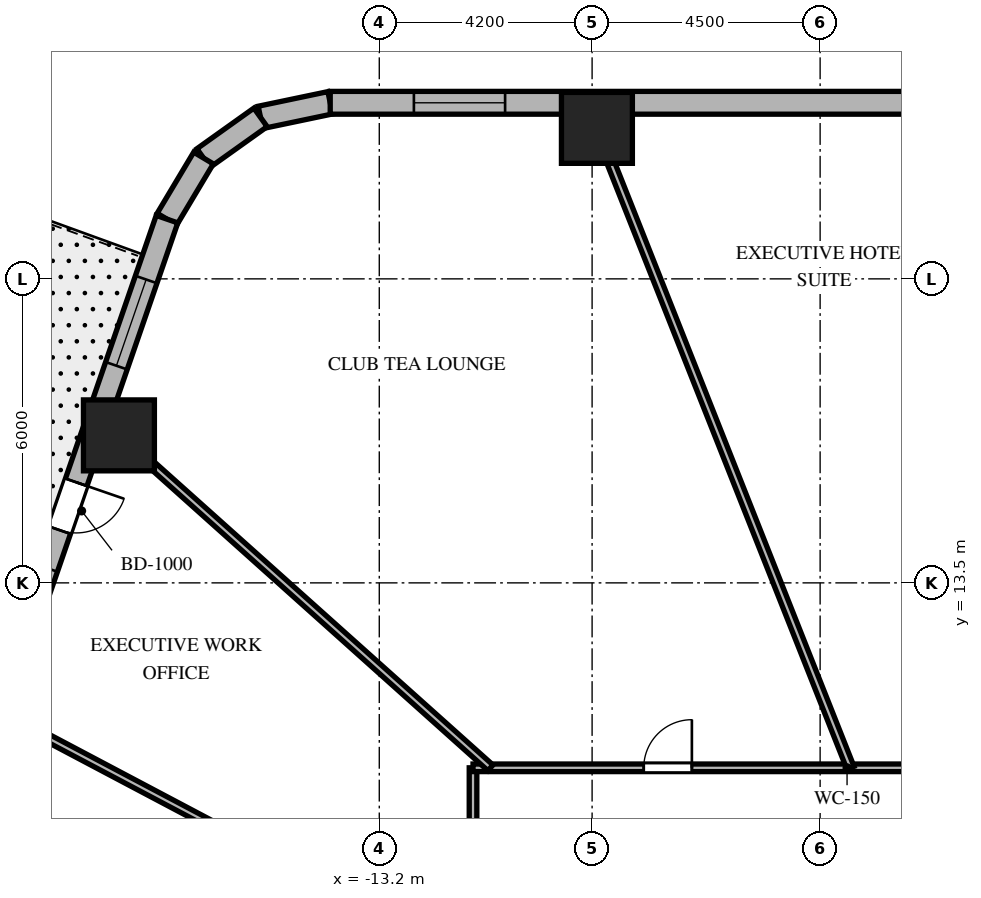
"""IFC4 building model, lengths in metres.
Left out: names, types, materials, properties, quantities, classifications, styles, units other than length and angle.
Written with IfcOpenShell. Run it as: python <this file> out.ifc"""

import sys

from ifc_helpers import new_model, si_unit, direction, frame, frame_2d, origin, origin_2d, place, context, subcontext, project, spatial, rectangle, extrude, element, fill, save


model = new_model("IFC4")
c1 = context("Model", 3, precision=1e-05, world=origin(), true_north=direction((0.0, 1.0)))
c2 = subcontext(c1, "Body", "Model", "MODEL_VIEW")
j1 = project(units=[si_unit("LENGTHUNIT", "METRE"), si_unit("PLANEANGLEUNIT", "RADIAN")], contexts=[c1])
p1 = place(None, origin())
s1 = spatial("IfcSite", under=j1, at=p1, CompositionType="ELEMENT")
p2 = place(p1, origin())
s2 = spatial("IfcBuilding", under=s1, at=p2, CompositionType="ELEMENT")
p3 = place(p2, frame((0.0, 0.0, 78.6)))
s3 = spatial("IfcBuildingStorey", under=s2, at=p3, CompositionType="ELEMENT", Elevation=78.6)
for number, where, z_axis, x_axis in (
    (1, (-8.905, 22.48, 0.0), (0.0, 0.0, 1.0), (1.0, 0.0, 0.0)),
    (2, (-18.338, 16.411, 0.0), (0.0, 0.0, 1.0), (1.0, 0.0, 0.0)),
):
    element("IfcColumn", number, at=place(p3, frame(where, z_axis=z_axis, x_axis=x_axis)), inside=s3, PredefinedType="COLUMN", context=c2, shape_type="SweptSolid", body=[
        extrude(rectangle(XDim=1.4, YDim=1.4, at=origin_2d()), origin(), (0.0, 0.0, 1.0), 3.7),
    ])
p4 = place(p3, frame((-14.168, 22.975, 0.0), z_axis=(0.0, 0.0, 1.0), x_axis=(-0.978770371074, -0.204959900243, 0.0)))
e3 = element("IfcWall", 3, at=p4, inside=s3, PredefinedType="SOLIDWALL", context=c2, shape_type="SweptSolid", body=[
    extrude(rectangle(XDim=1.406, YDim=0.45, at=frame_2d((0.703, 0.0))), origin(), (0.0, 0.0, 1.0), 3.4),
])
p5 = place(p3, frame((-15.544, 22.687, 0.0), z_axis=(0.0, 0.0, 1.0), x_axis=(-0.814210854316, -0.580569276412, 0.0)))
e4 = element("IfcWall", 4, at=p5, inside=s3, PredefinedType="SOLIDWALL", context=c2, shape_type="SweptSolid", body=[
    extrude(rectangle(XDim=1.381, YDim=0.45, at=frame_2d((0.691, 0.0))), origin(), (0.0, 0.0, 1.0), 3.4),
])
p6 = place(p3, frame((-16.669, 21.885, 0.0), z_axis=(0.0, 0.0, 1.0), x_axis=(-0.512936712947, -0.858426425799, 0.0)))
e5 = element("IfcWall", 5, at=p6, inside=s3, PredefinedType="SOLIDWALL", context=c2, shape_type="SweptSolid", body=[
    extrude(rectangle(XDim=1.406, YDim=0.45, at=frame_2d((0.703, 0.0))), origin(), (0.0, 0.0, 1.0), 3.4),
])
p7 = place(p3, frame((12.221, 22.975, 0.0), z_axis=(0.0, 0.0, 1.0), x_axis=(-1.0, 0.0, 0.0)))
e6 = element("IfcWall", 6, at=p7, inside=s3, PredefinedType="SOLIDWALL", context=c2, shape_type="SweptSolid", body=[
    extrude(rectangle(XDim=26.389, YDim=0.45, at=frame_2d((13.195, 0.0))), origin(), (0.0, 0.0, 1.0), 3.4),
])
p8 = place(p7, frame((1.653, 0.0, 0.8)))
e7 = element("IfcOpeningElement", 7, at=p8, cuts=e6, PredefinedType="OPENING", context=c2, shape_type="SweptSolid", body=[
    extrude(rectangle(XDim=1.8, YDim=1.8, at=frame_2d((0.9, 0.9))), frame((0.0, 0.235, 0.0), z_axis=(0.0, -1.0, 0.0), x_axis=(1.0, 0.0, 0.0)), (0.0, 0.0, 1.0), 0.47),
])
p9 = place(p7, frame((12.296, 0.0, 0.8)))
e8 = element("IfcOpeningElement", 8, at=p9, cuts=e6, PredefinedType="OPENING", context=c2, shape_type="SweptSolid", body=[
    extrude(rectangle(XDim=1.8, YDim=1.8, at=frame_2d((0.9, 0.9))), frame((0.0, 0.235, 0.0), z_axis=(0.0, -1.0, 0.0), x_axis=(1.0, 0.0, 0.0)), (0.0, 0.0, 1.0), 0.47),
])
p10 = place(p7, frame((22.938, 0.0, 0.8)))
e9 = element("IfcOpeningElement", 9, at=p10, cuts=e6, PredefinedType="OPENING", context=c2, shape_type="SweptSolid", body=[
    extrude(rectangle(XDim=1.8, YDim=1.8, at=frame_2d((0.9, 0.9))), frame((0.0, 0.235, 0.0), z_axis=(0.0, -1.0, 0.0), x_axis=(1.0, 0.0, 0.0)), (0.0, 0.0, 1.0), 0.47),
])
p11 = place(p3, frame((-17.39, 20.678, 0.0), z_axis=(0.0, 0.0, 1.0), x_axis=(-0.326068018294, -0.945346310854, 0.0)))
e10 = element("IfcWall", 10, at=p11, inside=s3, PredefinedType="SOLIDWALL", context=c2, shape_type="SweptSolid", body=[
    extrude(rectangle(XDim=21.793, YDim=0.45, at=frame_2d((10.896, 0.0))), origin(), (0.0, 0.0, 1.0), 3.4),
])
p12 = place(p11, frame((5.493, 0.0, 0.0)))
e11 = element("IfcOpeningElement", 11, at=p12, cuts=e10, PredefinedType="OPENING", context=c2, shape_type="SweptSolid", body=[
    extrude(rectangle(XDim=1.0, YDim=2.15, at=frame_2d((0.5, 1.075))), frame((0.0, 0.235, 0.0), z_axis=(0.0, -1.0, 0.0), x_axis=(1.0, 0.0, 0.0)), (0.0, 0.0, 1.0), 0.47),
])
p13 = place(p11, frame((1.26, 0.0, 0.8)))
e12 = element("IfcOpeningElement", 12, at=p13, cuts=e10, PredefinedType="OPENING", context=c2, shape_type="SweptSolid", body=[
    extrude(rectangle(XDim=1.8, YDim=1.8, at=frame_2d((0.9, 0.9))), frame((0.0, 0.235, 0.0), z_axis=(0.0, -1.0, 0.0), x_axis=(1.0, 0.0, 0.0)), (0.0, 0.0, 1.0), 0.47),
])
p14 = place(p11, frame((7.283, 0.0, 0.8)))
e13 = element("IfcOpeningElement", 13, at=p14, cuts=e10, PredefinedType="OPENING", context=c2, shape_type="SweptSolid", body=[
    extrude(rectangle(XDim=1.8, YDim=1.8, at=frame_2d((0.9, 0.9))), frame((0.0, 0.235, 0.0), z_axis=(0.0, -1.0, 0.0), x_axis=(1.0, 0.0, 0.0)), (0.0, 0.0, 1.0), 0.47),
])
p15 = place(p11, frame((12.736, 0.0, 0.8)))
e14 = element("IfcOpeningElement", 14, at=p15, cuts=e10, PredefinedType="OPENING", context=c2, shape_type="SweptSolid", body=[
    extrude(rectangle(XDim=1.8, YDim=1.8, at=frame_2d((0.9, 0.9))), frame((0.0, 0.235, 0.0), z_axis=(0.0, -1.0, 0.0), x_axis=(1.0, 0.0, 0.0)), (0.0, 0.0, 1.0), 0.47),
])
p16 = place(p11, frame((18.68, 0.0, 0.8)))
e15 = element("IfcOpeningElement", 15, at=p16, cuts=e10, PredefinedType="OPENING", context=c2, shape_type="SweptSolid", body=[
    extrude(rectangle(XDim=1.8, YDim=1.8, at=frame_2d((0.9, 0.9))), frame((0.0, 0.235, 0.0), z_axis=(0.0, -1.0, 0.0), x_axis=(1.0, 0.0, 0.0)), (0.0, 0.0, 1.0), 0.47),
])
p17 = place(p3, frame((-11.35, -9.85, 0.0), z_axis=(0.0, 0.0, 1.0), x_axis=(0.0, 1.0, 0.0)))
e16 = element("IfcWall", 16, at=p17, inside=s3, PredefinedType="PARTITIONING", context=c2, shape_type="SweptSolid", body=[
    extrude(rectangle(XDim=19.7, YDim=0.15, at=frame_2d((9.85, 0.0))), origin(), (0.0, 0.0, 1.0), 2.84),
])
p18 = place(p17, frame((17.206, 0.0, 0.0)))
e17 = element("IfcOpeningElement", 17, at=p18, cuts=e16, PredefinedType="OPENING", context=c2, shape_type="SweptSolid", body=[
    extrude(rectangle(XDim=0.9, YDim=2.03, at=frame_2d((0.45, 1.015))), frame((0.0, 0.085, 0.0), z_axis=(0.0, -1.0, 0.0), x_axis=(1.0, 0.0, 0.0)), (0.0, 0.0, 1.0), 0.17),
])
p19 = place(p17, frame((13.403, 0.0, 0.0)))
e18 = element("IfcOpeningElement", 18, at=p19, cuts=e16, PredefinedType="OPENING", context=c2, shape_type="SweptSolid", body=[
    extrude(rectangle(XDim=0.95, YDim=2.03, at=frame_2d((0.475, 1.015))), frame((0.0, 0.085, 0.0), z_axis=(0.0, -1.0, 0.0), x_axis=(1.0, 0.0, 0.0)), (0.0, 0.0, 1.0), 0.17),
])
p20 = place(p17, frame((10.134, 0.0, 0.0)))
e19 = element("IfcOpeningElement", 19, at=p20, cuts=e16, PredefinedType="OPENING", context=c2, shape_type="SweptSolid", body=[
    extrude(rectangle(XDim=0.95, YDim=2.03, at=frame_2d((0.475, 1.015))), frame((0.0, 0.085, 0.0), z_axis=(0.0, -1.0, 0.0), x_axis=(1.0, 0.0, 0.0)), (0.0, 0.0, 1.0), 0.17),
])
p21 = place(p17, frame((7.571, 0.0, 0.0)))
e20 = element("IfcOpeningElement", 20, at=p21, cuts=e16, PredefinedType="OPENING", context=c2, shape_type="SweptSolid", body=[
    extrude(rectangle(XDim=0.95, YDim=2.03, at=frame_2d((0.475, 1.015))), frame((0.0, 0.085, 0.0), z_axis=(0.0, -1.0, 0.0), x_axis=(1.0, 0.0, 0.0)), (0.0, 0.0, 1.0), 0.17),
])
p22 = place(p17, frame((3.024, 0.0, 0.0)))
e21 = element("IfcOpeningElement", 21, at=p22, cuts=e16, PredefinedType="OPENING", context=c2, shape_type="SweptSolid", body=[
    extrude(rectangle(XDim=0.95, YDim=2.03, at=frame_2d((0.475, 1.015))), frame((0.0, 0.085, 0.0), z_axis=(0.0, -1.0, 0.0), x_axis=(1.0, 0.0, 0.0)), (0.0, 0.0, 1.0), 0.17),
])
p23 = place(p3, frame((-11.35, 9.85, 0.0), z_axis=(0.0, 0.0, 1.0), x_axis=(1.0, 0.0, 0.0)))
e22 = element("IfcWall", 22, at=p23, inside=s3, PredefinedType="PARTITIONING", context=c2, shape_type="SweptSolid", body=[
    extrude(rectangle(XDim=22.7, YDim=0.15, at=frame_2d((11.35, 0.0))), origin(), (0.0, 0.0, 1.0), 2.84),
])
p24 = place(p23, frame((18.837, 0.0, 0.0)))
e23 = element("IfcOpeningElement", 23, at=p24, cuts=e22, PredefinedType="OPENING", context=c2, shape_type="SweptSolid", body=[
    extrude(rectangle(XDim=0.9, YDim=2.03, at=frame_2d((0.45, 1.015))), frame((0.0, 0.085, 0.0), z_axis=(0.0, -1.0, 0.0), x_axis=(1.0, 0.0, 0.0)), (0.0, 0.0, 1.0), 0.17),
])
p25 = place(p23, frame((15.532, 0.0, 0.0)))
e24 = element("IfcOpeningElement", 24, at=p25, cuts=e22, PredefinedType="OPENING", context=c2, shape_type="SweptSolid", body=[
    extrude(rectangle(XDim=0.95, YDim=2.03, at=frame_2d((0.475, 1.015))), frame((0.0, 0.085, 0.0), z_axis=(0.0, -1.0, 0.0), x_axis=(1.0, 0.0, 0.0)), (0.0, 0.0, 1.0), 0.17),
])
p26 = place(p23, frame((10.444, 0.0, 0.0)))
e25 = element("IfcOpeningElement", 25, at=p26, cuts=e22, PredefinedType="OPENING", context=c2, shape_type="SweptSolid", body=[
    extrude(rectangle(XDim=0.95, YDim=2.03, at=frame_2d((0.475, 1.015))), frame((0.0, 0.085, 0.0), z_axis=(0.0, -1.0, 0.0), x_axis=(1.0, 0.0, 0.0)), (0.0, 0.0, 1.0), 0.17),
])
p27 = place(p23, frame((3.369, 0.0, 0.0)))
e26 = element("IfcOpeningElement", 26, at=p27, cuts=e22, PredefinedType="OPENING", context=c2, shape_type="SweptSolid", body=[
    extrude(rectangle(XDim=0.95, YDim=2.03, at=frame_2d((0.475, 1.015))), frame((0.0, 0.085, 0.0), z_axis=(0.0, -1.0, 0.0), x_axis=(1.0, 0.0, 0.0)), (0.0, 0.0, 1.0), 0.17),
])
p28 = place(p3, frame((-3.902, 9.85, 0.0), z_axis=(0.0, 0.0, 1.0), x_axis=(-0.36828765711, 0.929711891728, 0.0)))
e27 = element("IfcWall", 27, at=p28, inside=s3, PredefinedType="PARTITIONING", context=c2, shape_type="SweptSolid", body=[
    extrude(rectangle(XDim=14.117, YDim=0.15, at=frame_2d((7.059, 0.0))), origin(), (0.0, 0.0, 1.0), 2.54),
])
p29 = place(p3, frame((-11.007, 9.85, 0.0), z_axis=(0.0, 0.0, 1.0), x_axis=(-0.745177305978, 0.666866390407, 0.0)))
e28 = element("IfcWall", 28, at=p29, inside=s3, PredefinedType="PARTITIONING", context=c2, shape_type="SweptSolid", body=[
    extrude(rectangle(XDim=10.375, YDim=0.15, at=frame_2d((5.188, 0.0))), origin(), (0.0, 0.0, 1.0), 2.54),
])
p30 = place(p3, frame((-11.35, 6.001, 0.0), z_axis=(0.0, 0.0, 1.0), x_axis=(-0.884022077319, 0.467445148453, 0.0)))
e29 = element("IfcWall", 29, at=p30, inside=s3, PredefinedType="PARTITIONING", context=c2, shape_type="SweptSolid", body=[
    extrude(rectangle(XDim=10.621, YDim=0.15, at=frame_2d((5.311, 0.0))), origin(), (0.0, 0.0, 1.0), 2.54),
])
p31 = place(p10, origin())
e30 = element("IfcWindow", 30, at=p31, inside=s3, PartitioningType="SINGLE_PANEL", PredefinedType="WINDOW", context=c2, shape_type="SweptSolid", body=[
    extrude(rectangle(XDim=1.8, YDim=1.8, at=frame_2d((0.9, 0.9))), frame((0.0, 0.03, 0.0), z_axis=(0.0, -1.0, 0.0), x_axis=(1.0, 0.0, 0.0)), (0.0, 0.0, 1.0), 0.06),
])
fill(e9, e30)
p32 = place(p12, origin())
e31 = element("IfcDoor", 31, at=p32, inside=s3, OperationType="SINGLE_SWING_LEFT", PredefinedType="DOOR", context=c2, shape_type="SweptSolid", body=[
    extrude(rectangle(XDim=1.0, YDim=2.15, at=frame_2d((0.5, 1.075))), frame((0.0, 0.025, 0.0), z_axis=(0.0, -1.0, 0.0), x_axis=(1.0, 0.0, 0.0)), (0.0, 0.0, 1.0), 0.05),
])
fill(e11, e31)
p33 = place(p13, origin())
e32 = element("IfcWindow", 32, at=p33, inside=s3, PartitioningType="SINGLE_PANEL", PredefinedType="WINDOW", context=c2, shape_type="SweptSolid", body=[
    extrude(rectangle(XDim=1.8, YDim=1.8, at=frame_2d((0.9, 0.9))), frame((0.0, 0.03, 0.0), z_axis=(0.0, -1.0, 0.0), x_axis=(1.0, 0.0, 0.0)), (0.0, 0.0, 1.0), 0.06),
])
fill(e12, e32)
p34 = place(p27, origin())
e33 = element("IfcDoor", 33, at=p34, inside=s3, OperationType="SINGLE_SWING_RIGHT", PredefinedType="DOOR", context=c2, shape_type="SweptSolid", body=[
    extrude(rectangle(XDim=0.95, YDim=2.03, at=frame_2d((0.475, 1.015))), frame((0.0, 0.025, 0.0), z_axis=(0.0, -1.0, 0.0), x_axis=(1.0, 0.0, 0.0)), (0.0, 0.0, 1.0), 0.05),
])
fill(e26, e33)
save(model, sys.argv[1])
